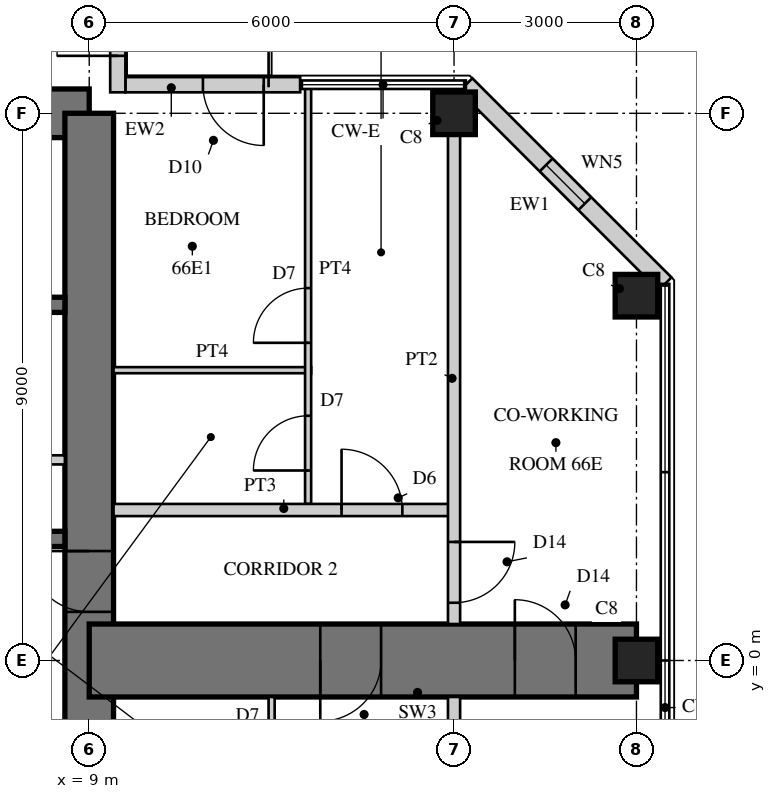
"""IFC4 building model, lengths in metres.
Left out: names, types, materials, properties, quantities, classifications, styles, units other than length and angle.
Written with IfcOpenShell. Run it as: python <this file> out.ifc"""

import sys

from ifc_helpers import new_model, si_unit, direction, frame, frame_2d, origin, origin_2d, place, context, subcontext, project, spatial, rectangle, hollow_rectangle, extrude, element, fill, save


model = new_model("IFC4")
c1 = context("Model", 3, precision=1e-05, world=origin(), true_north=direction((0.0, 1.0)))
c2 = subcontext(c1, "Body", "Model", "MODEL_VIEW")
j1 = project(units=[si_unit("LENGTHUNIT", "METRE"), si_unit("PLANEANGLEUNIT", "RADIAN")], contexts=[c1])
p1 = place(None, origin())
s1 = spatial("IfcSite", under=j1, at=p1, CompositionType="ELEMENT")
p2 = place(p1, origin())
s2 = spatial("IfcBuilding", under=s1, at=p2, CompositionType="ELEMENT")
p3 = place(p2, frame((0.0, 0.0, 257.7)))
s3 = spatial("IfcBuildingStorey", under=s2, at=p3, CompositionType="ELEMENT", Elevation=257.7)
p4 = place(p3, frame((9.0, 9.0, 0.0), z_axis=(0.0, 0.0, 1.0), x_axis=(-1.0, 0.0, 0.0)))
e1 = element("IfcWall", 1, at=p4, inside=s3, PredefinedType="SHEAR", context=c2, shape_type="SweptSolid", body=[
    extrude(rectangle(XDim=18.0, YDim=0.8, at=frame_2d((9.0, 0.0))), origin(), (0.0, 0.0, 1.0), 3.4),
])
p5 = place(p4, frame((9.8, 0.0, 0.0)))
e2 = element("IfcOpeningElement", 2, at=p5, cuts=e1, PredefinedType="OPENING", context=c2, shape_type="SweptSolid", body=[
    extrude(rectangle(XDim=1.0, YDim=2.4, at=frame_2d((0.5, 1.2))), frame((0.0, 0.41, 0.0), z_axis=(0.0, -1.0, 0.0), x_axis=(1.0, 0.0, 0.0)), (0.0, 0.0, 1.0), 0.82),
])
p6 = place(p3, frame((9.0, -9.0, 0.0), z_axis=(0.0, 0.0, 1.0), x_axis=(0.0, 1.0, 0.0)))
e3 = element("IfcWall", 3, at=p6, inside=s3, PredefinedType="SHEAR", context=c2, shape_type="SweptSolid", body=[
    extrude(rectangle(XDim=18.0, YDim=0.8, at=frame_2d((9.0, 0.0))), origin(), (0.0, 0.0, 1.0), 3.4),
])
p7 = place(p6, frame((9.8, 0.0, 0.0)))
e4 = element("IfcOpeningElement", 4, at=p7, cuts=e3, PredefinedType="OPENING", context=c2, shape_type="SweptSolid", body=[
    extrude(rectangle(XDim=1.0, YDim=2.4, at=frame_2d((0.5, 1.2))), frame((0.0, 0.41, 0.0), z_axis=(0.0, -1.0, 0.0), x_axis=(1.0, 0.0, 0.0)), (0.0, 0.0, 1.0), 0.82),
])
p8 = place(p3, frame((1.925, 2.0, 0.0), z_axis=(0.0, 0.0, 1.0), x_axis=(1.0, 0.0, 0.0)))
e5 = element("IfcWall", 5, at=p8, inside=s3, PredefinedType="SHEAR", context=c2, shape_type="SweptSolid", body=[
    extrude(rectangle(XDim=6.675, YDim=0.25, at=frame_2d((3.337, 0.0))), origin(), (0.0, 0.0, 1.0), 3.4),
])
p9 = place(p3, frame((1.925, 5.85, 0.0), z_axis=(0.0, 0.0, 1.0), x_axis=(1.0, 0.0, 0.0)))
e6 = element("IfcWall", 6, at=p9, inside=s3, PredefinedType="SHEAR", context=c2, shape_type="SweptSolid", body=[
    extrude(rectangle(XDim=6.675, YDim=0.25, at=frame_2d((3.337, 0.0))), origin(), (0.0, 0.0, 1.0), 3.4),
])
p10 = place(p9, frame((0.546, 0.0, 0.0)))
e7 = element("IfcOpeningElement", 7, at=p10, cuts=e6, PredefinedType="OPENING", context=c2, shape_type="SweptSolid", body=[
    extrude(rectangle(XDim=1.0, YDim=2.1, at=frame_2d((0.5, 1.05))), frame((0.0, 0.135, 0.0), z_axis=(0.0, -1.0, 0.0), x_axis=(1.0, 0.0, 0.0)), (0.0, 0.0, 1.0), 0.27),
])
p11 = place(p9, frame((5.129, 0.0, 0.0)))
e8 = element("IfcOpeningElement", 8, at=p11, cuts=e6, PredefinedType="OPENING", context=c2, shape_type="SweptSolid", body=[
    extrude(rectangle(XDim=1.0, YDim=2.1, at=frame_2d((0.5, 1.05))), frame((0.0, 0.135, 0.0), z_axis=(0.0, -1.0, 0.0), x_axis=(1.0, 0.0, 0.0)), (0.0, 0.0, 1.0), 0.27),
])
p12 = place(p3, frame((1.925, 3.3, 0.0), z_axis=(0.0, 0.0, 1.0), x_axis=(1.0, 0.0, 0.0)))
e9 = element("IfcWall", 9, at=p12, inside=s3, PredefinedType="PARTITIONING", context=c2, shape_type="SweptSolid", body=[
    extrude(rectangle(XDim=6.675, YDim=0.15, at=frame_2d((3.337, 0.0))), origin(), (0.0, 0.0, 1.0), 3.4),
])
p13 = place(p12, frame((0.075, 0.0, 0.0)))
e10 = element("IfcOpeningElement", 10, at=p13, cuts=e9, PredefinedType="OPENING", context=c2, shape_type="SweptSolid", body=[
    extrude(rectangle(XDim=0.8, YDim=2.1, at=frame_2d((0.4, 1.05))), frame((0.0, 0.085, 0.0), z_axis=(0.0, -1.0, 0.0), x_axis=(1.0, 0.0, 0.0)), (0.0, 0.0, 1.0), 0.17),
])
p14 = place(p12, frame((3.675, 0.0, 0.0)))
e11 = element("IfcOpeningElement", 11, at=p14, cuts=e9, PredefinedType="OPENING", context=c2, shape_type="SweptSolid", body=[
    extrude(rectangle(XDim=0.8, YDim=2.1, at=frame_2d((0.4, 1.05))), frame((0.0, 0.085, 0.0), z_axis=(0.0, -1.0, 0.0), x_axis=(1.0, 0.0, 0.0)), (0.0, 0.0, 1.0), 0.17),
])
p15 = place(p3, frame((9.0, 0.0, 0.0), z_axis=(0.0, 0.0, 1.0), x_axis=(1.0, 0.0, 0.0)))
e12 = element("IfcWall", 12, at=p15, inside=s3, PredefinedType="SHEAR", context=c2, shape_type="SweptSolid", body=[
    extrude(rectangle(XDim=9.0, YDim=1.2, at=frame_2d((4.5, 0.0))), origin(), (0.0, 0.0, 1.0), 3.4),
])
p16 = place(p15, frame((3.8, 0.0, 0.0)))
e13 = element("IfcOpeningElement", 13, at=p16, cuts=e12, PredefinedType="OPENING", context=c2, shape_type="SweptSolid", body=[
    extrude(rectangle(XDim=1.0, YDim=2.15, at=frame_2d((0.5, 1.075))), frame((0.0, 0.61, 0.0), z_axis=(0.0, -1.0, 0.0), x_axis=(1.0, 0.0, 0.0)), (0.0, 0.0, 1.0), 1.22),
])
p17 = place(p15, frame((7.0, 0.0, 0.0)))
e14 = element("IfcOpeningElement", 14, at=p17, cuts=e12, PredefinedType="OPENING", context=c2, shape_type="SweptSolid", body=[
    extrude(rectangle(XDim=1.0, YDim=2.2, at=frame_2d((0.5, 1.1))), frame((0.0, 0.61, 0.0), z_axis=(0.0, -1.0, 0.0), x_axis=(1.0, 0.0, 0.0)), (0.0, 0.0, 1.0), 1.22),
])
for number, where, z_axis, x_axis in (
    (15, (15.0, 9.0, 0.0), (0.0, 0.0, 1.0), (1.0, 0.0, 0.0)),
    (16, (18.0, 0.0, 0.0), (0.0, 0.0, 1.0), (1.0, 0.0, 0.0)),
    (17, (18.0, 6.0, 0.0), (0.0, 0.0, 1.0), (1.0, 0.0, 0.0)),
):
    element("IfcColumn", number, at=place(p3, frame(where, z_axis=z_axis, x_axis=x_axis)), inside=s3, PredefinedType="COLUMN", context=c2, shape_type="SweptSolid", body=[
        extrude(rectangle(XDim=0.7, YDim=0.7, at=origin_2d()), origin(), (0.0, 0.0, 1.0), 3.4),
    ])
p18 = place(p3, frame((18.47, 6.195, 0.0), z_axis=(0.0, 0.0, 1.0), x_axis=(-0.707106781187, 0.707106781187, 0.0)))
e18 = element("IfcWall", 18, at=p18, inside=s3, PredefinedType="SOLIDWALL", context=c2, shape_type="SweptSolid", body=[
    extrude(rectangle(XDim=4.632, YDim=0.3, at=frame_2d((2.316, 0.0))), origin(), (0.0, 0.0, 1.0), 3.22),
])
p19 = place(p18, frame((1.866, 0.0, 0.3)))
e19 = element("IfcOpeningElement", 19, at=p19, cuts=e18, PredefinedType="OPENING", context=c2, shape_type="SweptSolid", body=[
    extrude(rectangle(XDim=0.9, YDim=2.4, at=frame_2d((0.45, 1.2))), frame((0.0, 0.16, 0.0), z_axis=(0.0, -1.0, 0.0), x_axis=(1.0, 0.0, 0.0)), (0.0, 0.0, 1.0), 0.32),
])
p20 = place(p3, frame((12.47, 9.47, 0.0), z_axis=(0.0, 0.0, 1.0), x_axis=(-1.0, 0.0, 0.0)))
e20 = element("IfcWall", 20, at=p20, inside=s3, PredefinedType="SOLIDWALL", context=c2, shape_type="SweptSolid", body=[
    extrude(rectangle(XDim=2.875, YDim=0.25, at=frame_2d((1.438, 0.0))), origin(), (0.0, 0.0, 1.0), 3.22),
])
p21 = place(p20, frame((0.6, 0.0, 0.0)))
e21 = element("IfcOpeningElement", 21, at=p21, cuts=e20, PredefinedType="OPENING", context=c2, shape_type="SweptSolid", body=[
    extrude(rectangle(XDim=1.0, YDim=2.2, at=frame_2d((0.5, 1.1))), frame((0.0, 0.135, 0.0), z_axis=(0.0, -1.0, 0.0), x_axis=(1.0, 0.0, 0.0)), (0.0, 0.0, 1.0), 0.27),
])
p22 = place(p3, frame((9.47, 9.345, 0.0), z_axis=(0.0, 0.0, 1.0), x_axis=(0.0, 1.0, 0.0)))
e22 = element("IfcWall", 22, at=p22, inside=s3, PredefinedType="SOLIDWALL", context=c2, shape_type="SweptSolid", body=[
    extrude(rectangle(XDim=3.125, YDim=0.25, at=frame_2d((1.562, 0.0))), origin(), (0.0, 0.0, 1.0), 3.22),
])
p23 = place(p22, frame((0.6, 0.0, 0.0)))
e23 = element("IfcOpeningElement", 23, at=p23, cuts=e22, PredefinedType="OPENING", context=c2, shape_type="SweptSolid", body=[
    extrude(rectangle(XDim=1.0, YDim=2.2, at=frame_2d((0.5, 1.1))), frame((0.0, 0.135, 0.0), z_axis=(0.0, -1.0, 0.0), x_axis=(1.0, 0.0, 0.0)), (0.0, 0.0, 1.0), 0.27),
])
p24 = place(p3, frame((9.4, 4.775, 0.0), z_axis=(0.0, 0.0, 1.0), x_axis=(1.0, 0.0, 0.0)))
e24 = element("IfcWall", 24, at=p24, inside=s3, PredefinedType="PARTITIONING", context=c2, shape_type="SweptSolid", body=[
    extrude(rectangle(XDim=3.25, YDim=0.1, at=frame_2d((1.625, 0.0))), origin(), (0.0, 0.0, 1.0), 3.22),
])
p25 = place(p3, frame((12.6, 2.575, 0.0), z_axis=(0.0, 0.0, 1.0), x_axis=(0.0, 1.0, 0.0)))
e25 = element("IfcWall", 25, at=p25, inside=s3, PredefinedType="PARTITIONING", context=c2, shape_type="SweptSolid", body=[
    extrude(rectangle(XDim=6.855, YDim=0.1, at=frame_2d((3.427, 0.0))), origin(), (0.0, 0.0, 1.0), 3.22),
])
p26 = place(p25, frame((0.55, 0.0, 0.0)))
e26 = element("IfcOpeningElement", 26, at=p26, cuts=e25, PredefinedType="OPENING", context=c2, shape_type="SweptSolid", body=[
    extrude(rectangle(XDim=0.9, YDim=2.1, at=frame_2d((0.45, 1.05))), frame((0.0, 0.06, 0.0), z_axis=(0.0, -1.0, 0.0), x_axis=(1.0, 0.0, 0.0)), (0.0, 0.0, 1.0), 0.12),
])
p27 = place(p25, frame((2.65, 0.0, 0.0)))
e27 = element("IfcOpeningElement", 27, at=p27, cuts=e25, PredefinedType="OPENING", context=c2, shape_type="SweptSolid", body=[
    extrude(rectangle(XDim=0.9, YDim=2.1, at=frame_2d((0.45, 1.05))), frame((0.0, 0.06, 0.0), z_axis=(0.0, -1.0, 0.0), x_axis=(1.0, 0.0, 0.0)), (0.0, 0.0, 1.0), 0.12),
])
p28 = place(p3, frame((12.0, -9.345, 0.0), z_axis=(0.0, 0.0, 1.0), x_axis=(0.0, 1.0, 0.0)))
e28 = element("IfcWall", 28, at=p28, inside=s3, PredefinedType="PARTITIONING", context=c2, shape_type="SweptSolid", body=[
    extrude(rectangle(XDim=8.745, YDim=0.1, at=frame_2d((4.373, 0.0))), origin(), (0.0, 0.0, 1.0), 3.22),
])
p29 = place(p28, frame((5.195, 0.0, 0.0)))
e29 = element("IfcOpeningElement", 29, at=p29, cuts=e28, PredefinedType="OPENING", context=c2, shape_type="SweptSolid", body=[
    extrude(rectangle(XDim=0.9, YDim=2.1, at=frame_2d((0.45, 1.05))), frame((0.0, 0.06, 0.0), z_axis=(0.0, -1.0, 0.0), x_axis=(1.0, 0.0, 0.0)), (0.0, 0.0, 1.0), 0.12),
])
p30 = place(p28, frame((7.295, 0.0, 0.0)))
e30 = element("IfcOpeningElement", 30, at=p30, cuts=e28, PredefinedType="OPENING", context=c2, shape_type="SweptSolid", body=[
    extrude(rectangle(XDim=0.9, YDim=2.1, at=frame_2d((0.45, 1.05))), frame((0.0, 0.06, 0.0), z_axis=(0.0, -1.0, 0.0), x_axis=(1.0, 0.0, 0.0)), (0.0, 0.0, 1.0), 0.12),
])
p31 = place(p3, frame((9.4, 2.475, 0.0), z_axis=(0.0, 0.0, 1.0), x_axis=(1.0, 0.0, 0.0)))
e31 = element("IfcWall", 31, at=p31, inside=s3, PredefinedType="SOLIDWALL", context=c2, shape_type="SweptSolid", body=[
    extrude(rectangle(XDim=5.6, YDim=0.2, at=frame_2d((2.8, 0.0))), origin(), (0.0, 0.0, 1.0), 3.22),
])
p32 = place(p31, frame((3.75, 0.0, 0.0)))
e32 = element("IfcOpeningElement", 32, at=p32, cuts=e31, PredefinedType="OPENING", context=c2, shape_type="SweptSolid", body=[
    extrude(rectangle(XDim=1.0, YDim=2.15, at=frame_2d((0.5, 1.075))), frame((0.0, 0.11, 0.0), z_axis=(0.0, -1.0, 0.0), x_axis=(1.0, 0.0, 0.0)), (0.0, 0.0, 1.0), 0.22),
])
p33 = place(p3, frame((15.0, -8.65, 0.0), z_axis=(0.0, 0.0, 1.0), x_axis=(0.0, 1.0, 0.0)))
e33 = element("IfcWall", 33, at=p33, inside=s3, PredefinedType="SOLIDWALL", context=c2, shape_type="SweptSolid", body=[
    extrude(rectangle(XDim=8.05, YDim=0.2, at=frame_2d((4.025, 0.0))), origin(), (0.0, 0.0, 1.0), 2.52),
])
p34 = place(p3, frame((15.0, 0.6, 0.0), z_axis=(0.0, 0.0, 1.0), x_axis=(0.0, 1.0, 0.0)))
e34 = element("IfcWall", 34, at=p34, inside=s3, PredefinedType="SOLIDWALL", context=c2, shape_type="SweptSolid", body=[
    extrude(rectangle(XDim=8.05, YDim=0.2, at=frame_2d((4.025, 0.0))), origin(), (0.0, 0.0, 1.0), 2.52),
])
p35 = place(p34, frame((0.35, 0.0, 0.0)))
e35 = element("IfcOpeningElement", 35, at=p35, cuts=e34, PredefinedType="OPENING", context=c2, shape_type="SweptSolid", body=[
    extrude(rectangle(XDim=1.0, YDim=2.2, at=frame_2d((0.5, 1.1))), frame((0.0, 0.11, 0.0), z_axis=(0.0, -1.0, 0.0), x_axis=(1.0, 0.0, 0.0)), (0.0, 0.0, 1.0), 0.22),
])
p36 = place(p19, origin())
e36 = element("IfcWindow", 36, at=p36, inside=s3, PartitioningType="SINGLE_PANEL", PredefinedType="WINDOW", context=c2, shape_type="SweptSolid", body=[
    extrude(hollow_rectangle(XDim=0.9, YDim=2.4, WallThickness=0.06, at=frame_2d((0.45, 1.2))), frame((0.0, 0.03, 0.0), z_axis=(0.0, -1.0, 0.0), x_axis=(1.0, 0.0, 0.0)), (0.0, 0.0, 1.0), 0.06),
    extrude(rectangle(XDim=0.779, YDim=2.279, at=frame_2d((0.45, 1.2))), frame((0.0, 0.03, 0.0), z_axis=(0.0, -1.0, 0.0), x_axis=(1.0, 0.0, 0.0)), (0.0, 0.0, 1.0), 0.06),
])
fill(e19, e36)
p37 = place(p21, origin())
e37 = element("IfcDoor", 37, at=p37, inside=s3, OperationType="SINGLE_SWING_LEFT", PredefinedType="DOOR", context=c2, shape_type="SweptSolid", body=[
    extrude(hollow_rectangle(XDim=1.0, YDim=2.2, WallThickness=0.06, at=frame_2d((0.5, 1.1))), frame((0.0, 0.025, 0.0), z_axis=(0.0, -1.0, 0.0), x_axis=(1.0, 0.0, 0.0)), (0.0, 0.0, 1.0), 0.05),
    extrude(rectangle(XDim=0.879, YDim=2.079, at=frame_2d((0.5, 1.1))), frame((0.0, 0.025, 0.0), z_axis=(0.0, -1.0, 0.0), x_axis=(1.0, 0.0, 0.0)), (0.0, 0.0, 1.0), 0.05),
])
fill(e21, e37)
p38 = place(p23, origin())
e38 = element("IfcDoor", 38, at=p38, inside=s3, OperationType="SINGLE_SWING_LEFT", PredefinedType="DOOR", context=c2, shape_type="SweptSolid", body=[
    extrude(hollow_rectangle(XDim=1.0, YDim=2.2, WallThickness=0.06, at=frame_2d((0.5, 1.1))), frame((0.0, 0.025, 0.0), z_axis=(0.0, -1.0, 0.0), x_axis=(1.0, 0.0, 0.0)), (0.0, 0.0, 1.0), 0.05),
    extrude(rectangle(XDim=0.879, YDim=2.079, at=frame_2d((0.5, 1.1))), frame((0.0, 0.025, 0.0), z_axis=(0.0, -1.0, 0.0), x_axis=(1.0, 0.0, 0.0)), (0.0, 0.0, 1.0), 0.05),
])
fill(e23, e38)
p39 = place(p26, origin())
e39 = element("IfcDoor", 39, at=p39, inside=s3, OperationType="SINGLE_SWING_LEFT", PredefinedType="DOOR", context=c2, shape_type="SweptSolid", body=[
    extrude(rectangle(XDim=0.9, YDim=2.1, at=frame_2d((0.45, 1.05))), frame((0.0, 0.025, 0.0), z_axis=(0.0, -1.0, 0.0), x_axis=(1.0, 0.0, 0.0)), (0.0, 0.0, 1.0), 0.05),
])
fill(e26, e39)
p40 = place(p27, origin())
e40 = element("IfcDoor", 40, at=p40, inside=s3, OperationType="SINGLE_SWING_LEFT", PredefinedType="DOOR", context=c2, shape_type="SweptSolid", body=[
    extrude(rectangle(XDim=0.9, YDim=2.1, at=frame_2d((0.45, 1.05))), frame((0.0, 0.025, 0.0), z_axis=(0.0, -1.0, 0.0), x_axis=(1.0, 0.0, 0.0)), (0.0, 0.0, 1.0), 0.05),
])
fill(e27, e40)
p41 = place(p32, origin())
e41 = element("IfcDoor", 41, at=p41, inside=s3, OperationType="SINGLE_SWING_LEFT", PredefinedType="DOOR", context=c2, shape_type="SweptSolid", body=[
    extrude(rectangle(XDim=1.0, YDim=2.15, at=frame_2d((0.5, 1.075))), frame((0.0, 0.025, 0.0), z_axis=(0.0, -1.0, 0.0), x_axis=(1.0, 0.0, 0.0)), (0.0, 0.0, 1.0), 0.05),
])
fill(e32, e41)
p42 = place(p35, frame((1.0, 0.0, 0.0), z_axis=(0.0, 0.0, 1.0), x_axis=(-1.0, 0.0, 0.0)))
e42 = element("IfcDoor", 42, at=p42, inside=s3, OperationType="SINGLE_SWING_LEFT", PredefinedType="DOOR", context=c2, shape_type="SweptSolid", body=[
    extrude(rectangle(XDim=1.0, YDim=2.2, at=frame_2d((0.5, 1.1))), frame((0.0, 0.025, 0.0), z_axis=(0.0, -1.0, 0.0), x_axis=(1.0, 0.0, 0.0)), (0.0, 0.0, 1.0), 0.05),
])
fill(e35, e42)
p43 = place(p16, frame((1.0, 0.0, 0.0), z_axis=(0.0, 0.0, 1.0), x_axis=(-1.0, 0.0, 0.0)))
e43 = element("IfcDoor", 43, at=p43, inside=s3, OperationType="SINGLE_SWING_RIGHT", PredefinedType="DOOR", context=c2, shape_type="SweptSolid", body=[
    extrude(rectangle(XDim=1.0, YDim=2.15, at=frame_2d((0.5, 1.075))), frame((0.0, 0.025, 0.0), z_axis=(0.0, -1.0, 0.0), x_axis=(1.0, 0.0, 0.0)), (0.0, 0.0, 1.0), 0.05),
])
fill(e13, e43)
p44 = place(p17, origin())
e44 = element("IfcDoor", 44, at=p44, inside=s3, OperationType="SINGLE_SWING_LEFT", PredefinedType="DOOR", context=c2, shape_type="SweptSolid", body=[
    extrude(rectangle(XDim=1.0, YDim=2.2, at=frame_2d((0.5, 1.1))), frame((0.0, 0.025, 0.0), z_axis=(0.0, -1.0, 0.0), x_axis=(1.0, 0.0, 0.0)), (0.0, 0.0, 1.0), 0.05),
])
fill(e14, e44)
p45 = place(p7, origin())
e45 = element("IfcDoor", 45, at=p45, inside=s3, OperationType="SINGLE_SWING_RIGHT", PredefinedType="DOOR", context=c2, shape_type="SweptSolid", body=[
    extrude(rectangle(XDim=1.0, YDim=2.4, at=frame_2d((0.5, 1.2))), frame((0.0, 0.055, 0.0), z_axis=(0.0, -1.0, 0.0), x_axis=(1.0, 0.0, 0.0)), (0.0, 0.0, 1.0), 0.05),
])
fill(e4, e45)
save(model, sys.argv[1])
